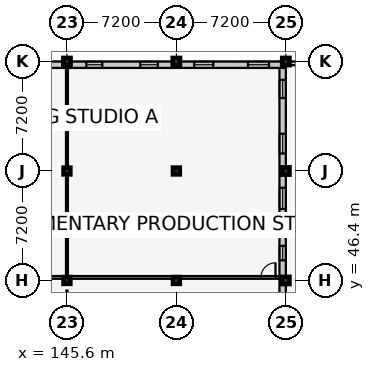
"""IFC4 building model, lengths in metres.
Left out: names, types, materials, properties, quantities, classifications, styles, units other than length and angle.
Written with IfcOpenShell. Run it as: python <this file> out.ifc"""

import sys

from ifc_helpers import new_model, si_unit, direction, frame, frame_2d, origin, origin_2d, place, context, subcontext, project, spatial, rectangle, extrude, element, fill, save


model = new_model("IFC4")
c1 = context("Model", 3, precision=1e-05, world=origin(), true_north=direction((0.0, 1.0)))
c2 = subcontext(c1, "Body", "Model", "MODEL_VIEW")
j1 = project(units=[si_unit("LENGTHUNIT", "METRE"), si_unit("PLANEANGLEUNIT", "RADIAN")], contexts=[c1])
p1 = place(None, origin())
s1 = spatial("IfcSite", under=j1, at=p1, CompositionType="ELEMENT")
p2 = place(p1, origin())
s2 = spatial("IfcBuilding", under=s1, at=p2, CompositionType="ELEMENT")
p3 = place(p2, frame((0.0, 0.0, 13.8)))
s3 = spatial("IfcBuildingStorey", under=s2, at=p3, CompositionType="ELEMENT", Elevation=13.8)
for number, where, z_axis, x_axis in (
    (1, (145.6, 46.4, 0.0), (0.0, 0.0, 1.0), (1.0, 0.0, 0.0)),
    (2, (145.6, 53.6, 0.0), (0.0, 0.0, 1.0), (1.0, 0.0, 0.0)),
):
    element("IfcColumn", number, at=place(p3, frame(where, z_axis=z_axis, x_axis=x_axis)), inside=s3, PredefinedType="COLUMN", context=c2, shape_type="SweptSolid", body=[
        extrude(rectangle(XDim=0.45, YDim=0.45, at=origin_2d()), origin(), (0.0, 0.0, 1.0), 4.2),
    ])
p4 = place(p3, frame((145.6, 60.8, 0.0), z_axis=(0.0, 0.0, 1.0), x_axis=(1.0, 0.0, 0.0)))
e3 = element("IfcColumn", 3, at=p4, inside=s3, PredefinedType="COLUMN", context=c2, shape_type="SweptSolid", body=[
    extrude(rectangle(XDim=0.48, YDim=0.48, at=origin_2d()), origin(), (0.0, 0.0, 1.0), 4.2),
])
for number, where, z_axis, x_axis in (
    (4, (152.8, 46.4, 0.0), (0.0, 0.0, 1.0), (1.0, 0.0, 0.0)),
    (5, (152.8, 53.6, 0.0), (0.0, 0.0, 1.0), (1.0, 0.0, 0.0)),
):
    element("IfcColumn", number, at=place(p3, frame(where, z_axis=z_axis, x_axis=x_axis)), inside=s3, PredefinedType="COLUMN", context=c2, shape_type="SweptSolid", body=[
        extrude(rectangle(XDim=0.45, YDim=0.45, at=origin_2d()), origin(), (0.0, 0.0, 1.0), 4.2),
    ])
for number, where, z_axis, x_axis in (
    (6, (152.8, 60.8, 0.0), (0.0, 0.0, 1.0), (1.0, 0.0, 0.0)),
    (7, (160.0, 46.4, 0.0), (0.0, 0.0, 1.0), (1.0, 0.0, 0.0)),
    (8, (160.0, 53.6, 0.0), (0.0, 0.0, 1.0), (1.0, 0.0, 0.0)),
    (9, (160.0, 60.8, 0.0), (0.0, 0.0, 1.0), (1.0, 0.0, 0.0)),
):
    element("IfcColumn", number, at=place(p3, frame(where, z_axis=z_axis, x_axis=x_axis)), inside=s3, PredefinedType="COLUMN", context=c2, shape_type="SweptSolid", body=[
        extrude(rectangle(XDim=0.48, YDim=0.48, at=origin_2d()), origin(), (0.0, 0.0, 1.0), 4.2),
    ])
p5 = place(p3, frame((159.79, 60.8, 0.0), z_axis=(0.0, 0.0, 1.0), x_axis=(0.0, -1.0, 0.0)))
e10 = element("IfcWall", 10, at=p5, inside=s3, PredefinedType="SOLIDWALL", context=c2, shape_type="SweptSolid", body=[
    extrude(rectangle(XDim=21.6, YDim=0.42, at=frame_2d((10.8, 0.0))), origin(), (0.0, 0.0, 1.0), 3.215),
])
p6 = place(p5, frame((1.2, 0.0, 0.9)))
e11 = element("IfcOpeningElement", 11, at=p6, cuts=e10, PredefinedType="OPENING", context=c2, shape_type="SweptSolid", body=[
    extrude(rectangle(XDim=1.2, YDim=1.35, at=frame_2d((0.6, 0.675))), frame((0.0, 0.222, 0.0), z_axis=(0.0, -1.0, 0.0), x_axis=(1.0, 0.0, 0.0)), (0.0, 0.0, 1.0), 0.444),
])
p7 = place(p5, frame((4.75, 0.0, 0.9)))
e12 = element("IfcOpeningElement", 12, at=p7, cuts=e10, PredefinedType="OPENING", context=c2, shape_type="SweptSolid", body=[
    extrude(rectangle(XDim=1.3, YDim=1.35, at=frame_2d((0.65, 0.675))), frame((0.0, 0.222, 0.0), z_axis=(0.0, -1.0, 0.0), x_axis=(1.0, 0.0, 0.0)), (0.0, 0.0, 1.0), 0.444),
])
p8 = place(p5, frame((8.3, 0.0, 0.9)))
e13 = element("IfcOpeningElement", 13, at=p8, cuts=e10, PredefinedType="OPENING", context=c2, shape_type="SweptSolid", body=[
    extrude(rectangle(XDim=1.4, YDim=1.35, at=frame_2d((0.7, 0.675))), frame((0.0, 0.222, 0.0), z_axis=(0.0, -1.0, 0.0), x_axis=(1.0, 0.0, 0.0)), (0.0, 0.0, 1.0), 0.444),
])
p9 = place(p5, frame((12.125, 0.0, 0.9)))
e14 = element("IfcOpeningElement", 14, at=p9, cuts=e10, PredefinedType="OPENING", context=c2, shape_type="SweptSolid", body=[
    extrude(rectangle(XDim=0.95, YDim=1.45, at=frame_2d((0.475, 0.725))), frame((0.0, 0.222, 0.0), z_axis=(0.0, -1.0, 0.0), x_axis=(1.0, 0.0, 0.0)), (0.0, 0.0, 1.0), 0.444),
])
p10 = place(p5, frame((19.225, 0.0, 0.9)))
e15 = element("IfcOpeningElement", 15, at=p10, cuts=e10, PredefinedType="OPENING", context=c2, shape_type="SweptSolid", body=[
    extrude(rectangle(XDim=1.15, YDim=1.45, at=frame_2d((0.575, 0.725))), frame((0.0, 0.222, 0.0), z_axis=(0.0, -1.0, 0.0), x_axis=(1.0, 0.0, 0.0)), (0.0, 0.0, 1.0), 0.444),
])
p11 = place(p3, frame((131.2, 60.59, 0.0), z_axis=(0.0, 0.0, 1.0), x_axis=(1.0, 0.0, 0.0)))
e16 = element("IfcWall", 16, at=p11, inside=s3, PredefinedType="SOLIDWALL", context=c2, shape_type="SweptSolid", body=[
    extrude(rectangle(XDim=28.8, YDim=0.42, at=frame_2d((14.4, 0.0))), origin(), (0.0, 0.0, 1.0), 3.255),
])
p12 = place(p11, frame((1.175, 0.0, 0.9)))
e17 = element("IfcOpeningElement", 17, at=p12, cuts=e16, PredefinedType="OPENING", context=c2, shape_type="SweptSolid", body=[
    extrude(rectangle(XDim=1.25, YDim=1.45, at=frame_2d((0.625, 0.725))), frame((0.0, 0.222, 0.0), z_axis=(0.0, -1.0, 0.0), x_axis=(1.0, 0.0, 0.0)), (0.0, 0.0, 1.0), 0.444),
])
p13 = place(p11, frame((4.725, 0.0, 0.9)))
e18 = element("IfcOpeningElement", 18, at=p13, cuts=e16, PredefinedType="OPENING", context=c2, shape_type="SweptSolid", body=[
    extrude(rectangle(XDim=1.35, YDim=1.45, at=frame_2d((0.675, 0.725))), frame((0.0, 0.222, 0.0), z_axis=(0.0, -1.0, 0.0), x_axis=(1.0, 0.0, 0.0)), (0.0, 0.0, 1.0), 0.444),
])
p14 = place(p11, frame((8.275, 0.0, 0.9)))
e19 = element("IfcOpeningElement", 19, at=p14, cuts=e16, PredefinedType="OPENING", context=c2, shape_type="SweptSolid", body=[
    extrude(rectangle(XDim=1.45, YDim=1.45, at=frame_2d((0.725, 0.725))), frame((0.0, 0.222, 0.0), z_axis=(0.0, -1.0, 0.0), x_axis=(1.0, 0.0, 0.0)), (0.0, 0.0, 1.0), 0.444),
])
p15 = place(p11, frame((12.15, 0.0, 0.9)))
e20 = element("IfcOpeningElement", 20, at=p15, cuts=e16, PredefinedType="OPENING", context=c2, shape_type="SweptSolid", body=[
    extrude(rectangle(XDim=0.9, YDim=1.6, at=frame_2d((0.45, 0.8))), frame((0.0, 0.222, 0.0), z_axis=(0.0, -1.0, 0.0), x_axis=(1.0, 0.0, 0.0)), (0.0, 0.0, 1.0), 0.444),
])
p16 = place(p11, frame((15.675, 0.0, 0.9)))
e21 = element("IfcOpeningElement", 21, at=p16, cuts=e16, PredefinedType="OPENING", context=c2, shape_type="SweptSolid", body=[
    extrude(rectangle(XDim=1.05, YDim=1.6, at=frame_2d((0.525, 0.8))), frame((0.0, 0.222, 0.0), z_axis=(0.0, -1.0, 0.0), x_axis=(1.0, 0.0, 0.0)), (0.0, 0.0, 1.0), 0.444),
])
p17 = place(p11, frame((19.225, 0.0, 0.9)))
e22 = element("IfcOpeningElement", 22, at=p17, cuts=e16, PredefinedType="OPENING", context=c2, shape_type="SweptSolid", body=[
    extrude(rectangle(XDim=1.15, YDim=1.6, at=frame_2d((0.575, 0.8))), frame((0.0, 0.222, 0.0), z_axis=(0.0, -1.0, 0.0), x_axis=(1.0, 0.0, 0.0)), (0.0, 0.0, 1.0), 0.444),
])
p18 = place(p11, frame((22.775, 0.0, 0.9)))
e23 = element("IfcOpeningElement", 23, at=p18, cuts=e16, PredefinedType="OPENING", context=c2, shape_type="SweptSolid", body=[
    extrude(rectangle(XDim=1.25, YDim=1.6, at=frame_2d((0.625, 0.8))), frame((0.0, 0.222, 0.0), z_axis=(0.0, -1.0, 0.0), x_axis=(1.0, 0.0, 0.0)), (0.0, 0.0, 1.0), 0.444),
])
p19 = place(p11, frame((26.31, 0.0, 0.9)))
e24 = element("IfcOpeningElement", 24, at=p19, cuts=e16, PredefinedType="OPENING", context=c2, shape_type="SweptSolid", body=[
    extrude(rectangle(XDim=1.38, YDim=1.6, at=frame_2d((0.69, 0.8))), frame((0.0, 0.222, 0.0), z_axis=(0.0, -1.0, 0.0), x_axis=(1.0, 0.0, 0.0)), (0.0, 0.0, 1.0), 0.444),
])
p20 = place(p3, frame((160.15, 60.68, 0.0), z_axis=(0.0, 0.0, 1.0), x_axis=(1.0, 0.0, 0.0)))
e25 = element("IfcWall", 25, at=p20, inside=s3, PredefinedType="PARAPET", context=c2, shape_type="SweptSolid", body=[
    extrude(rectangle(XDim=8.1, YDim=0.24, at=frame_2d((4.05, 0.0))), origin(), (0.0, 0.0, 1.0), 0.65),
])
p21 = place(p3, frame((134.8, 46.6, 0.0), z_axis=(0.0, 0.0, 1.0), x_axis=(1.0, 0.0, 0.0)))
e26 = element("IfcWall", 26, at=p21, inside=s3, PredefinedType="PARTITIONING", context=c2, shape_type="SweptSolid", body=[
    extrude(rectangle(XDim=24.77, YDim=0.18, at=frame_2d((12.385, 0.0))), origin(), (0.0, 0.0, 1.0), 3.085),
])
p22 = place(p21, frame((23.56, 0.0, 0.0)))
e27 = element("IfcOpeningElement", 27, at=p22, cuts=e26, PredefinedType="OPENING", context=c2, shape_type="SweptSolid", body=[
    extrude(rectangle(XDim=0.96, YDim=2.1, at=frame_2d((0.48, 1.05))), frame((0.0, 0.102, 0.0), z_axis=(0.0, -1.0, 0.0), x_axis=(1.0, 0.0, 0.0)), (0.0, 0.0, 1.0), 0.204),
])
p23 = place(p3, frame((145.6, 46.7, 0.0), z_axis=(0.0, 0.0, 1.0), x_axis=(0.0, 1.0, 0.0)))
e28 = element("IfcWall", 28, at=p23, inside=s3, PredefinedType="PARTITIONING", context=c2, shape_type="SweptSolid", body=[
    extrude(rectangle(XDim=13.67, YDim=0.125, at=frame_2d((6.835, 0.0))), origin(), (0.0, 0.0, 1.0), 3.335),
])
p24 = place(p6, origin())
e29 = element("IfcWindow", 29, at=p24, inside=s3, PartitioningType="SINGLE_PANEL", PredefinedType="WINDOW", context=c2, shape_type="SweptSolid", body=[
    extrude(rectangle(XDim=1.2, YDim=1.35, at=frame_2d((0.6, 0.675))), frame((0.0, 0.03, 0.0), z_axis=(0.0, -1.0, 0.0), x_axis=(1.0, 0.0, 0.0)), (0.0, 0.0, 1.0), 0.06),
])
fill(e11, e29)
p25 = place(p7, origin())
e30 = element("IfcWindow", 30, at=p25, inside=s3, PartitioningType="SINGLE_PANEL", PredefinedType="WINDOW", context=c2, shape_type="SweptSolid", body=[
    extrude(rectangle(XDim=1.3, YDim=1.35, at=frame_2d((0.65, 0.675))), frame((0.0, 0.03, 0.0), z_axis=(0.0, -1.0, 0.0), x_axis=(1.0, 0.0, 0.0)), (0.0, 0.0, 1.0), 0.06),
])
fill(e12, e30)
p26 = place(p8, origin())
e31 = element("IfcWindow", 31, at=p26, inside=s3, PartitioningType="SINGLE_PANEL", PredefinedType="WINDOW", context=c2, shape_type="SweptSolid", body=[
    extrude(rectangle(XDim=1.4, YDim=1.35, at=frame_2d((0.7, 0.675))), frame((0.0, 0.03, 0.0), z_axis=(0.0, -1.0, 0.0), x_axis=(1.0, 0.0, 0.0)), (0.0, 0.0, 1.0), 0.06),
])
fill(e13, e31)
p27 = place(p9, origin())
e32 = element("IfcWindow", 32, at=p27, inside=s3, PartitioningType="SINGLE_PANEL", PredefinedType="WINDOW", context=c2, shape_type="SweptSolid", body=[
    extrude(rectangle(XDim=0.95, YDim=1.45, at=frame_2d((0.475, 0.725))), frame((0.0, 0.03, 0.0), z_axis=(0.0, -1.0, 0.0), x_axis=(1.0, 0.0, 0.0)), (0.0, 0.0, 1.0), 0.06),
])
fill(e14, e32)
p28 = place(p16, origin())
e33 = element("IfcWindow", 33, at=p28, inside=s3, PartitioningType="SINGLE_PANEL", PredefinedType="WINDOW", context=c2, shape_type="SweptSolid", body=[
    extrude(rectangle(XDim=1.05, YDim=1.6, at=frame_2d((0.525, 0.8))), frame((0.0, 0.03, 0.0), z_axis=(0.0, -1.0, 0.0), x_axis=(1.0, 0.0, 0.0)), (0.0, 0.0, 1.0), 0.06),
])
fill(e21, e33)
p29 = place(p17, origin())
e34 = element("IfcWindow", 34, at=p29, inside=s3, PartitioningType="SINGLE_PANEL", PredefinedType="WINDOW", context=c2, shape_type="SweptSolid", body=[
    extrude(rectangle(XDim=1.15, YDim=1.6, at=frame_2d((0.575, 0.8))), frame((0.0, 0.03, 0.0), z_axis=(0.0, -1.0, 0.0), x_axis=(1.0, 0.0, 0.0)), (0.0, 0.0, 1.0), 0.06),
])
fill(e22, e34)
p30 = place(p18, origin())
e35 = element("IfcWindow", 35, at=p30, inside=s3, PartitioningType="SINGLE_PANEL", PredefinedType="WINDOW", context=c2, shape_type="SweptSolid", body=[
    extrude(rectangle(XDim=1.25, YDim=1.6, at=frame_2d((0.625, 0.8))), frame((0.0, 0.03, 0.0), z_axis=(0.0, -1.0, 0.0), x_axis=(1.0, 0.0, 0.0)), (0.0, 0.0, 1.0), 0.06),
])
fill(e23, e35)
p31 = place(p19, origin())
e36 = element("IfcWindow", 36, at=p31, inside=s3, PartitioningType="SINGLE_PANEL", PredefinedType="WINDOW", context=c2, shape_type="SweptSolid", body=[
    extrude(rectangle(XDim=1.38, YDim=1.6, at=frame_2d((0.69, 0.8))), frame((0.0, 0.03, 0.0), z_axis=(0.0, -1.0, 0.0), x_axis=(1.0, 0.0, 0.0)), (0.0, 0.0, 1.0), 0.06),
])
fill(e24, e36)
p32 = place(p22, origin())
e37 = element("IfcDoor", 37, at=p32, inside=s3, OperationType="SINGLE_SWING_RIGHT", PredefinedType="DOOR", context=c2, shape_type="SweptSolid", body=[
    extrude(rectangle(XDim=0.96, YDim=2.1, at=frame_2d((0.48, 1.05))), frame((0.0, 0.025, 0.0), z_axis=(0.0, -1.0, 0.0), x_axis=(1.0, 0.0, 0.0)), (0.0, 0.0, 1.0), 0.05),
])
fill(e27, e37)
save(model, sys.argv[1])
